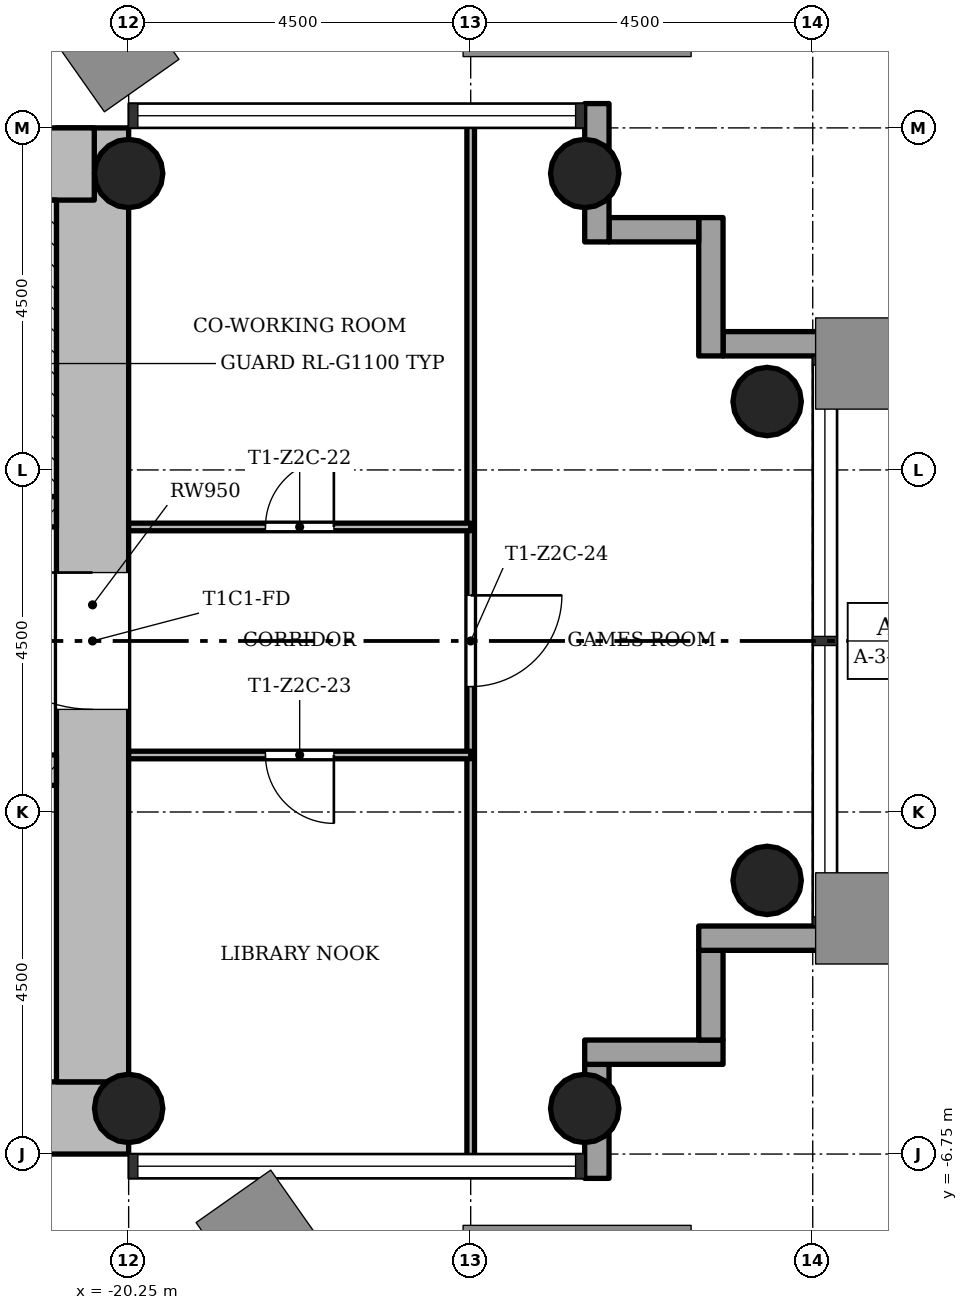
"""IFC4 building model, lengths in metres.
Left out: names, types, materials, properties, quantities, classifications, styles, units other than length and angle.
Written with IfcOpenShell. Run it as: python <this file> out.ifc"""

import sys

from ifc_helpers import new_model, si_unit, direction, frame, frame_2d, origin, origin_2d, place, context, subcontext, project, spatial, rectangle, hollow_circle, extrude, element, fill, save


model = new_model("IFC4")
c1 = context("Model", 3, precision=1e-05, world=origin(), true_north=direction((0.0, 1.0)))
c2 = subcontext(c1, "Body", "Model", "MODEL_VIEW")
j1 = project(units=[si_unit("LENGTHUNIT", "METRE"), si_unit("PLANEANGLEUNIT", "RADIAN")], contexts=[c1])
p1 = place(None, origin())
s1 = spatial("IfcSite", under=j1, at=p1, CompositionType="ELEMENT")
p2 = place(p1, origin())
s2 = spatial("IfcBuilding", under=s1, at=p2, CompositionType="ELEMENT")
p3 = place(p2, frame((0.0, 0.0, 86.8)))
s3 = spatial("IfcBuildingStorey", under=s2, at=p3, CompositionType="ELEMENT", Elevation=86.8)
p4 = place(p3, frame((-28.3, -6.275, 0.0), z_axis=(0.0, 0.0, 1.0), x_axis=(1.0, 0.0, 0.0)))
e1 = element("IfcWall", 1, at=p4, inside=s3, PredefinedType="SHEAR", context=c2, shape_type="SweptSolid", body=[
    extrude(rectangle(XDim=8.05, YDim=0.95, at=frame_2d((4.025, 0.0))), origin(), (0.0, 0.0, 1.0), 3.4),
])
p5 = place(p3, frame((-20.725, -5.8, 0.0), z_axis=(0.0, 0.0, 1.0), x_axis=(0.0, 1.0, 0.0)))
e2 = element("IfcWall", 2, at=p5, inside=s3, PredefinedType="SHEAR", context=c2, shape_type="SweptSolid", body=[
    extrude(rectangle(XDim=12.55, YDim=0.95, at=frame_2d((6.275, 0.0))), origin(), (0.0, 0.0, 1.0), 3.4),
])
p6 = place(p5, frame((4.9, 0.0, 0.0)))
e3 = element("IfcOpeningElement", 3, at=p6, cuts=e2, PredefinedType="OPENING", context=c2, shape_type="SweptSolid", body=[
    extrude(rectangle(XDim=1.8, YDim=2.1, at=frame_2d((0.9, 1.05))), frame((0.0, 0.485, 0.0), z_axis=(0.0, -1.0, 0.0), x_axis=(1.0, 0.0, 0.0)), (0.0, 0.0, 1.0), 0.97),
])
p7 = place(p3, frame((-20.702, 6.275, 0.0), z_axis=(0.0, 0.0, 1.0), x_axis=(-1.0, 0.0, 0.0)))
e4 = element("IfcWall", 4, at=p7, inside=s3, PredefinedType="SHEAR", context=c2, shape_type="SweptSolid", body=[
    extrude(rectangle(XDim=8.696, YDim=0.95, at=frame_2d((4.348, 0.0))), origin(), (0.0, 0.0, 1.0), 3.4),
])
p8 = place(p3, frame((-28.3, -1.7, 0.0), z_axis=(0.0, 0.0, 1.0), x_axis=(1.0, 0.0, 0.0)))
e5 = element("IfcWall", 5, at=p8, inside=s3, PredefinedType="SHEAR", context=c2, shape_type="SweptSolid", body=[
    extrude(rectangle(XDim=7.1, YDim=0.4, at=frame_2d((3.55, 0.0))), origin(), (0.0, 0.0, 1.0), 3.4),
])
p9 = place(p8, frame((0.8, 0.0, 0.0)))
e6 = element("IfcOpeningElement", 6, at=p9, cuts=e5, PredefinedType="OPENING", context=c2, shape_type="SweptSolid", body=[
    extrude(rectangle(XDim=1.1, YDim=2.1, at=frame_2d((0.55, 1.05))), frame((0.0, 0.21, 0.0), z_axis=(0.0, -1.0, 0.0), x_axis=(1.0, 0.0, 0.0)), (0.0, 0.0, 1.0), 0.42),
])
p10 = place(p8, frame((3.0, 0.0, 0.0)))
e7 = element("IfcOpeningElement", 7, at=p10, cuts=e5, PredefinedType="OPENING", context=c2, shape_type="SweptSolid", body=[
    extrude(rectangle(XDim=1.1, YDim=2.1, at=frame_2d((0.55, 1.05))), frame((0.0, 0.21, 0.0), z_axis=(0.0, -1.0, 0.0), x_axis=(1.0, 0.0, 0.0)), (0.0, 0.0, 1.0), 0.42),
])
p11 = place(p8, frame((5.2, 0.0, 0.0)))
e8 = element("IfcOpeningElement", 8, at=p11, cuts=e5, PredefinedType="OPENING", context=c2, shape_type="SweptSolid", body=[
    extrude(rectangle(XDim=1.1, YDim=2.1, at=frame_2d((0.55, 1.05))), frame((0.0, 0.21, 0.0), z_axis=(0.0, -1.0, 0.0), x_axis=(1.0, 0.0, 0.0)), (0.0, 0.0, 1.0), 0.42),
])
p12 = place(p3, frame((-28.3, 1.7, 0.0), z_axis=(0.0, 0.0, 1.0), x_axis=(1.0, 0.0, 0.0)))
e9 = element("IfcWall", 9, at=p12, inside=s3, PredefinedType="SHEAR", context=c2, shape_type="SweptSolid", body=[
    extrude(rectangle(XDim=7.1, YDim=0.4, at=frame_2d((3.55, 0.0))), origin(), (0.0, 0.0, 1.0), 3.4),
])
p13 = place(p12, frame((0.7, 0.0, 0.0)))
e10 = element("IfcOpeningElement", 10, at=p13, cuts=e9, PredefinedType="OPENING", context=c2, shape_type="SweptSolid", body=[
    extrude(rectangle(XDim=0.9, YDim=2.1, at=frame_2d((0.45, 1.05))), frame((0.0, 0.21, 0.0), z_axis=(0.0, -1.0, 0.0), x_axis=(1.0, 0.0, 0.0)), (0.0, 0.0, 1.0), 0.42),
])
for number, where, z_axis, x_axis in (
    (11, (-20.25, -6.15, 0.0), (0.0, 0.0, 1.0), (1.0, 0.0, 0.0)),
    (12, (-20.25, 6.15, 0.0), (0.0, 0.0, 1.0), (1.0, 0.0, 0.0)),
    (13, (-14.25, -6.15, 0.0), (0.0, 0.0, 1.0), (1.0, 0.0, 0.0)),
    (14, (-14.25, 6.15, 0.0), (0.0, 0.0, 1.0), (1.0, 0.0, 0.0)),
    (15, (-11.85, -3.15, 0.0), (0.0, 0.0, 1.0), (1.0, 0.0, 0.0)),
    (16, (-11.85, 3.15, 0.0), (0.0, 0.0, 1.0), (1.0, 0.0, 0.0)),
):
    element("IfcColumn", number, at=place(p3, frame(where, z_axis=z_axis, x_axis=x_axis)), inside=s3, PredefinedType="COLUMN", context=c2, shape_type="SweptSolid", body=[
        extrude(hollow_circle(Radius=0.45, WallThickness=0.032, at=origin_2d()), origin(), (0.0, 0.0, 1.0), 3.4),
    ])
p14 = place(p3, frame((-14.09, -7.07, -0.3), z_axis=(0.0, 0.0, 1.0), x_axis=(0.0, 1.0, 0.0)))
e17 = element("IfcWall", 17, at=p14, inside=s3, PredefinedType="STANDARD", context=c2, shape_type="SweptSolid", body=[
    extrude(rectangle(XDim=1.5, YDim=0.32, at=frame_2d((0.75, 0.0))), origin(), (0.0, 0.0, 1.0), 3.4),
])
p15 = place(p3, frame((-14.25, -5.41, -0.3), z_axis=(0.0, 0.0, 1.0), x_axis=(1.0, 0.0, 0.0)))
e18 = element("IfcWall", 18, at=p15, inside=s3, PredefinedType="STANDARD", context=c2, shape_type="SweptSolid", body=[
    extrude(rectangle(XDim=1.82, YDim=0.32, at=frame_2d((0.91, 0.0))), origin(), (0.0, 0.0, 1.0), 3.4),
])
p16 = place(p3, frame((-12.59, -5.25, -0.3), z_axis=(0.0, 0.0, 1.0), x_axis=(0.0, 1.0, 0.0)))
e19 = element("IfcWall", 19, at=p16, inside=s3, PredefinedType="STANDARD", context=c2, shape_type="SweptSolid", body=[
    extrude(rectangle(XDim=1.18, YDim=0.32, at=frame_2d((0.59, 0.0))), origin(), (0.0, 0.0, 1.0), 3.4),
])
p17 = place(p3, frame((-12.75, -3.91, -0.3), z_axis=(0.0, 0.0, 1.0), x_axis=(1.0, 0.0, 0.0)))
e20 = element("IfcWall", 20, at=p17, inside=s3, PredefinedType="STANDARD", context=c2, shape_type="SweptSolid", body=[
    extrude(rectangle(XDim=1.82, YDim=0.32, at=frame_2d((0.91, 0.0))), origin(), (0.0, 0.0, 1.0), 3.4),
])
p18 = place(p3, frame((-10.93, 3.91, -0.3), z_axis=(0.0, 0.0, 1.0), x_axis=(-1.0, 0.0, 0.0)))
e21 = element("IfcWall", 21, at=p18, inside=s3, PredefinedType="STANDARD", context=c2, shape_type="SweptSolid", body=[
    extrude(rectangle(XDim=1.5, YDim=0.32, at=frame_2d((0.75, 0.0))), origin(), (0.0, 0.0, 1.0), 3.4),
])
p19 = place(p3, frame((-12.59, 3.75, -0.3), z_axis=(0.0, 0.0, 1.0), x_axis=(0.0, 1.0, 0.0)))
e22 = element("IfcWall", 22, at=p19, inside=s3, PredefinedType="STANDARD", context=c2, shape_type="SweptSolid", body=[
    extrude(rectangle(XDim=1.82, YDim=0.32, at=frame_2d((0.91, 0.0))), origin(), (0.0, 0.0, 1.0), 3.4),
])
p20 = place(p3, frame((-12.75, 5.41, -0.3), z_axis=(0.0, 0.0, 1.0), x_axis=(-1.0, 0.0, 0.0)))
e23 = element("IfcWall", 23, at=p20, inside=s3, PredefinedType="STANDARD", context=c2, shape_type="SweptSolid", body=[
    extrude(rectangle(XDim=1.18, YDim=0.32, at=frame_2d((0.59, 0.0))), origin(), (0.0, 0.0, 1.0), 3.4),
])
p21 = place(p3, frame((-14.09, 5.25, -0.3), z_axis=(0.0, 0.0, 1.0), x_axis=(0.0, 1.0, 0.0)))
e24 = element("IfcWall", 24, at=p21, inside=s3, PredefinedType="STANDARD", context=c2, shape_type="SweptSolid", body=[
    extrude(rectangle(XDim=1.82, YDim=0.32, at=frame_2d((0.91, 0.0))), origin(), (0.0, 0.0, 1.0), 3.4),
])
p22 = place(p3, frame((-15.75, -6.85, 0.0), z_axis=(0.0, 0.0, 1.0), x_axis=(0.0, 1.0, 0.0)))
e25 = element("IfcWall", 25, at=p22, inside=s3, PredefinedType="PARTITIONING", context=c2, shape_type="SweptSolid", body=[
    extrude(rectangle(XDim=13.7, YDim=0.1, at=frame_2d((6.85, 0.0))), origin(), (0.0, 0.0, 1.0), 3.0),
])
p23 = place(p22, frame((6.25, 0.0, 0.0)))
e26 = element("IfcOpeningElement", 26, at=p23, cuts=e25, PredefinedType="OPENING", context=c2, shape_type="SweptSolid", body=[
    extrude(rectangle(XDim=1.2, YDim=2.1, at=frame_2d((0.6, 1.05))), frame((0.0, 0.06, 0.0), z_axis=(0.0, -1.0, 0.0), x_axis=(1.0, 0.0, 0.0)), (0.0, 0.0, 1.0), 0.12),
])
p24 = place(p3, frame((-20.25, -1.5, 0.0), z_axis=(0.0, 0.0, 1.0), x_axis=(1.0, 0.0, 0.0)))
e27 = element("IfcWall", 27, at=p24, inside=s3, PredefinedType="PARTITIONING", context=c2, shape_type="SweptSolid", body=[
    extrude(rectangle(XDim=4.5, YDim=0.1, at=frame_2d((2.25, 0.0))), origin(), (0.0, 0.0, 1.0), 3.0),
])
p25 = place(p24, frame((1.8, 0.0, 0.0)))
e28 = element("IfcOpeningElement", 28, at=p25, cuts=e27, PredefinedType="OPENING", context=c2, shape_type="SweptSolid", body=[
    extrude(rectangle(XDim=0.9, YDim=2.1, at=frame_2d((0.45, 1.05))), frame((0.0, 0.06, 0.0), z_axis=(0.0, -1.0, 0.0), x_axis=(1.0, 0.0, 0.0)), (0.0, 0.0, 1.0), 0.12),
])
p26 = place(p3, frame((-20.25, 1.5, 0.0), z_axis=(0.0, 0.0, 1.0), x_axis=(1.0, 0.0, 0.0)))
e29 = element("IfcWall", 29, at=p26, inside=s3, PredefinedType="PARTITIONING", context=c2, shape_type="SweptSolid", body=[
    extrude(rectangle(XDim=4.5, YDim=0.1, at=frame_2d((2.25, 0.0))), origin(), (0.0, 0.0, 1.0), 3.0),
])
p27 = place(p26, frame((1.8, 0.0, 0.0)))
e30 = element("IfcOpeningElement", 30, at=p27, cuts=e29, PredefinedType="OPENING", context=c2, shape_type="SweptSolid", body=[
    extrude(rectangle(XDim=0.9, YDim=2.1, at=frame_2d((0.45, 1.05))), frame((0.0, 0.06, 0.0), z_axis=(0.0, -1.0, 0.0), x_axis=(1.0, 0.0, 0.0)), (0.0, 0.0, 1.0), 0.12),
])
p28 = place(p3, frame((-21.325, 1.9, 0.0), z_axis=(0.0, 0.0, 1.0), x_axis=(0.0, 1.0, 0.0)))
e31 = element("IfcWall", 31, at=p28, inside=s3, PredefinedType="SHEAR", context=c2, shape_type="SweptSolid", body=[
    extrude(rectangle(XDim=3.9, YDim=0.25, at=frame_2d((1.95, 0.0))), origin(), (0.0, 0.0, 1.0), 3.4),
])
p29 = place(p27, origin())
e32 = element("IfcDoor", 32, at=p29, inside=s3, OperationType="SINGLE_SWING_LEFT", PredefinedType="DOOR", context=c2, shape_type="SweptSolid", body=[
    extrude(rectangle(XDim=0.9, YDim=2.1, at=frame_2d((0.45, 1.05))), frame((0.0, 0.025, 0.0), z_axis=(0.0, -1.0, 0.0), x_axis=(1.0, 0.0, 0.0)), (0.0, 0.0, 1.0), 0.05),
])
fill(e30, e32)
p30 = place(p25, origin())
e33 = element("IfcDoor", 33, at=p30, inside=s3, OperationType="SINGLE_SWING_RIGHT", PredefinedType="DOOR", context=c2, shape_type="SweptSolid", body=[
    extrude(rectangle(XDim=0.9, YDim=2.1, at=frame_2d((0.45, 1.05))), frame((0.0, 0.025, 0.0), z_axis=(0.0, -1.0, 0.0), x_axis=(1.0, 0.0, 0.0)), (0.0, 0.0, 1.0), 0.05),
])
fill(e28, e33)
p31 = place(p23, origin())
e34 = element("IfcDoor", 34, at=p31, inside=s3, OperationType="SINGLE_SWING_RIGHT", PredefinedType="DOOR", context=c2, shape_type="SweptSolid", body=[
    extrude(rectangle(XDim=1.2, YDim=2.1, at=frame_2d((0.6, 1.05))), frame((0.0, 0.025, 0.0), z_axis=(0.0, -1.0, 0.0), x_axis=(1.0, 0.0, 0.0)), (0.0, 0.0, 1.0), 0.05),
])
fill(e26, e34)
p32 = place(p6, origin())
e35 = element("IfcDoor", 35, at=p32, inside=s3, OperationType="SINGLE_SWING_LEFT", PredefinedType="DOOR", context=c2, shape_type="SweptSolid", body=[
    extrude(rectangle(XDim=1.8, YDim=2.1, at=frame_2d((0.9, 1.05))), frame((0.0, 0.025, 0.0), z_axis=(0.0, -1.0, 0.0), x_axis=(1.0, 0.0, 0.0)), (0.0, 0.0, 1.0), 0.05),
])
fill(e3, e35)
save(model, sys.argv[1])
